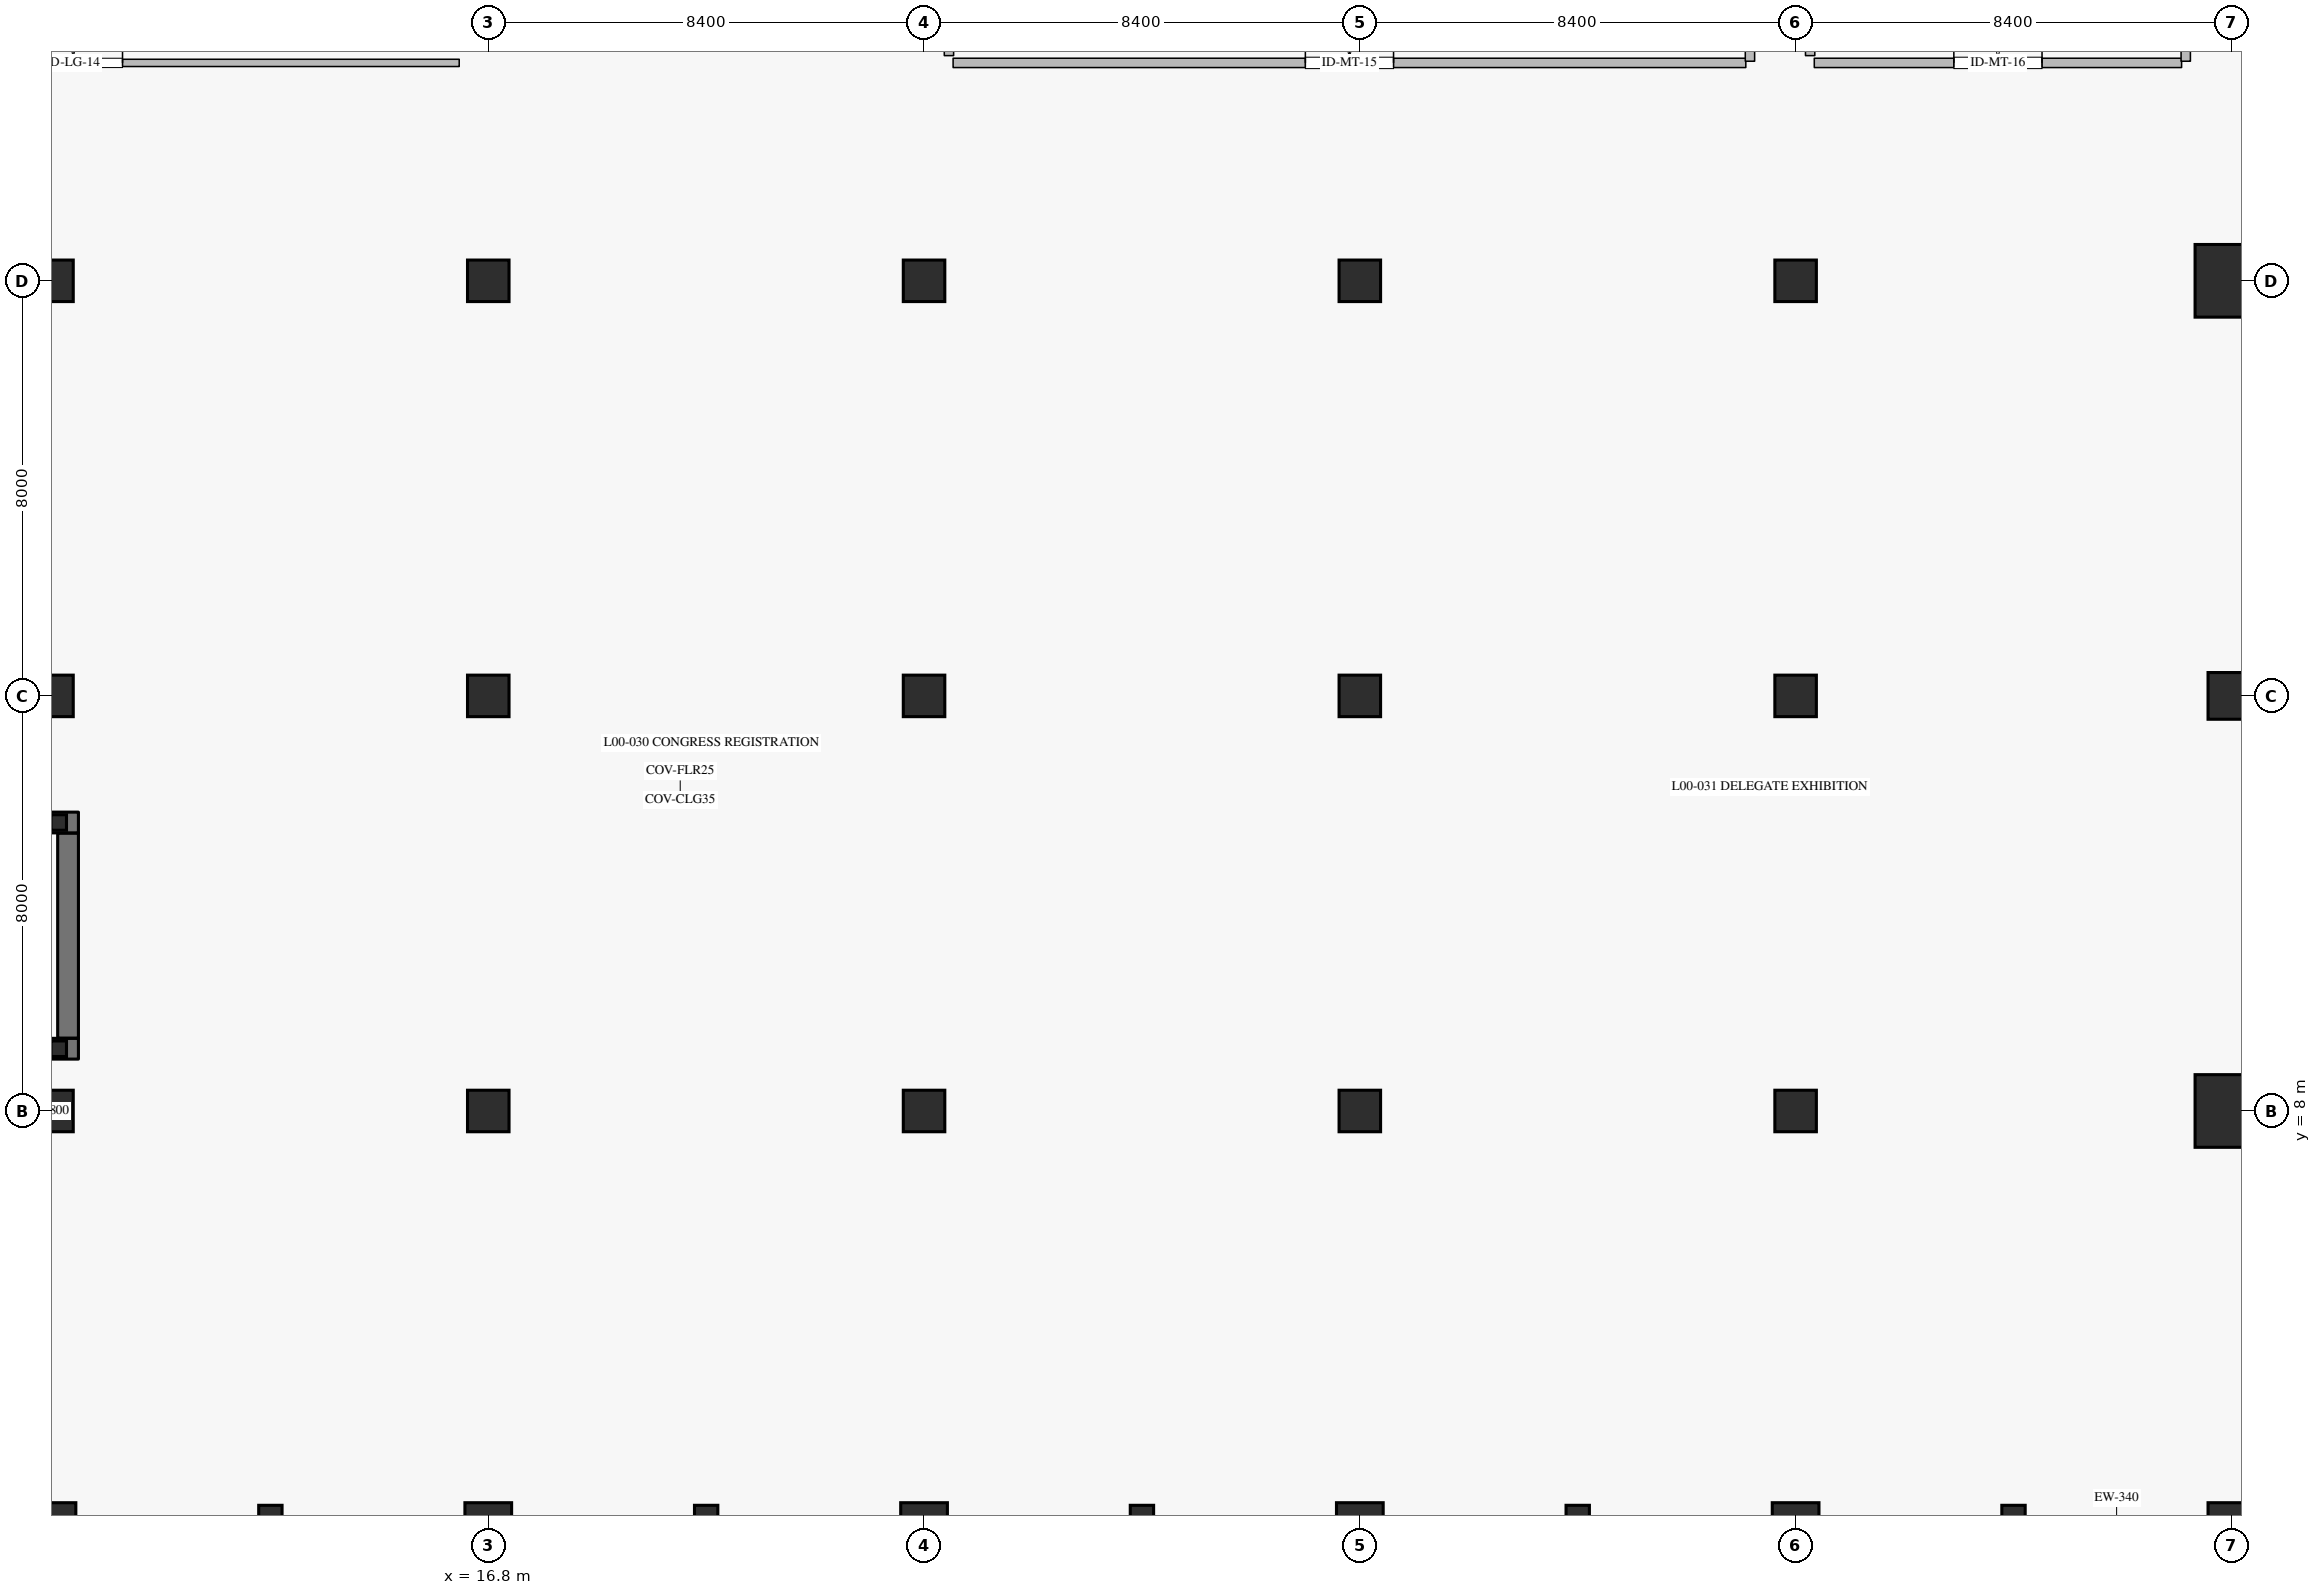
"""IFC4 building model, lengths in metres.
Left out: names, types, materials, properties, quantities, classifications, styles, units other than length and angle.
Written with IfcOpenShell. Run it as: python <this file> out.ifc"""

import sys

from ifc_helpers import new_model, si_unit, direction, frame, frame_2d, origin, origin_2d, place, context, subcontext, project, spatial, rectangle, hollow_rectangle, circle, extrude, element, fill, save


model = new_model("IFC4")
c1 = context("Model", 3, precision=1e-05, world=origin(), true_north=direction((0.0, 1.0)))
c2 = subcontext(c1, "Body", "Model", "MODEL_VIEW")
j1 = project(units=[si_unit("LENGTHUNIT", "METRE"), si_unit("PLANEANGLEUNIT", "RADIAN")], contexts=[c1])
p1 = place(None, origin())
s1 = spatial("IfcSite", under=j1, at=p1, CompositionType="ELEMENT")
p2 = place(p1, origin())
s2 = spatial("IfcBuilding", under=s1, at=p2, CompositionType="ELEMENT")
p3 = place(p2, origin())
s3 = spatial("IfcBuildingStorey", under=s2, at=p3, CompositionType="ELEMENT", Elevation=0.0)
p4 = place(p3, frame((8.4, 0.0, 0.0), z_axis=(0.0, 0.0, 1.0), x_axis=(1.0, 0.0, 0.0)))
e1 = element("IfcColumn", 1, at=p4, inside=s3, PredefinedType="COLUMN", context=c2, shape_type="SweptSolid", body=[
    extrude(rectangle(XDim=0.9, YDim=0.9, at=origin_2d()), origin(), (0.0, 0.0, 1.0), 6.0),
])
for number, where, z_axis, x_axis in (
    (2, (8.4, 8.0, 0.0), (0.0, 0.0, 1.0), (1.0, 0.0, 0.0)),
    (3, (8.4, 16.0, 0.0), (0.0, 0.0, 1.0), (1.0, 0.0, 0.0)),
    (4, (8.4, 24.0, 0.0), (0.0, 0.0, 1.0), (1.0, 0.0, 0.0)),
):
    element("IfcColumn", number, at=place(p3, frame(where, z_axis=z_axis, x_axis=x_axis)), inside=s3, PredefinedType="COLUMN", context=c2, shape_type="SweptSolid", body=[
        extrude(rectangle(XDim=0.8, YDim=0.8, at=origin_2d()), origin(), (0.0, 0.0, 1.0), 6.0),
    ])
p5 = place(p3, frame((12.6, 0.0, 0.0), z_axis=(0.0, 0.0, 1.0), x_axis=(1.0, 0.0, 0.0)))
e5 = element("IfcColumn", 5, at=p5, inside=s3, PredefinedType="PILASTER", context=c2, shape_type="SweptSolid", body=[
    extrude(rectangle(XDim=0.45, YDim=0.8, at=origin_2d()), origin(), (0.0, 0.0, 1.0), 6.0),
])
p6 = place(p3, frame((16.8, 0.0, 0.0), z_axis=(0.0, 0.0, 1.0), x_axis=(1.0, 0.0, 0.0)))
e6 = element("IfcColumn", 6, at=p6, inside=s3, PredefinedType="COLUMN", context=c2, shape_type="SweptSolid", body=[
    extrude(rectangle(XDim=0.9, YDim=0.9, at=origin_2d()), origin(), (0.0, 0.0, 1.0), 6.0),
])
for number, where, z_axis, x_axis in (
    (7, (16.8, 8.0, 0.0), (0.0, 0.0, 1.0), (1.0, 0.0, 0.0)),
    (8, (16.8, 16.0, 0.0), (0.0, 0.0, 1.0), (1.0, 0.0, 0.0)),
    (9, (16.8, 24.0, 0.0), (0.0, 0.0, 1.0), (1.0, 0.0, 0.0)),
):
    element("IfcColumn", number, at=place(p3, frame(where, z_axis=z_axis, x_axis=x_axis)), inside=s3, PredefinedType="COLUMN", context=c2, shape_type="SweptSolid", body=[
        extrude(rectangle(XDim=0.8, YDim=0.8, at=origin_2d()), origin(), (0.0, 0.0, 1.0), 6.0),
    ])
p7 = place(p3, frame((21.0, 0.0, 0.0), z_axis=(0.0, 0.0, 1.0), x_axis=(1.0, 0.0, 0.0)))
e10 = element("IfcColumn", 10, at=p7, inside=s3, PredefinedType="PILASTER", context=c2, shape_type="SweptSolid", body=[
    extrude(rectangle(XDim=0.45, YDim=0.8, at=origin_2d()), origin(), (0.0, 0.0, 1.0), 6.0),
])
p8 = place(p3, frame((25.2, 0.0, 0.0), z_axis=(0.0, 0.0, 1.0), x_axis=(1.0, 0.0, 0.0)))
e11 = element("IfcColumn", 11, at=p8, inside=s3, PredefinedType="COLUMN", context=c2, shape_type="SweptSolid", body=[
    extrude(rectangle(XDim=0.9, YDim=0.9, at=origin_2d()), origin(), (0.0, 0.0, 1.0), 6.0),
])
for number, where, z_axis, x_axis in (
    (12, (25.2, 8.0, 0.0), (0.0, 0.0, 1.0), (1.0, 0.0, 0.0)),
    (13, (25.2, 16.0, 0.0), (0.0, 0.0, 1.0), (1.0, 0.0, 0.0)),
    (14, (25.2, 24.0, 0.0), (0.0, 0.0, 1.0), (1.0, 0.0, 0.0)),
):
    element("IfcColumn", number, at=place(p3, frame(where, z_axis=z_axis, x_axis=x_axis)), inside=s3, PredefinedType="COLUMN", context=c2, shape_type="SweptSolid", body=[
        extrude(rectangle(XDim=0.8, YDim=0.8, at=origin_2d()), origin(), (0.0, 0.0, 1.0), 6.0),
    ])
p9 = place(p3, frame((29.4, 0.0, 0.0), z_axis=(0.0, 0.0, 1.0), x_axis=(1.0, 0.0, 0.0)))
e15 = element("IfcColumn", 15, at=p9, inside=s3, PredefinedType="PILASTER", context=c2, shape_type="SweptSolid", body=[
    extrude(rectangle(XDim=0.45, YDim=0.8, at=origin_2d()), origin(), (0.0, 0.0, 1.0), 6.0),
])
p10 = place(p3, frame((33.6, 0.0, 0.0), z_axis=(0.0, 0.0, 1.0), x_axis=(1.0, 0.0, 0.0)))
e16 = element("IfcColumn", 16, at=p10, inside=s3, PredefinedType="COLUMN", context=c2, shape_type="SweptSolid", body=[
    extrude(rectangle(XDim=0.9, YDim=0.9, at=origin_2d()), origin(), (0.0, 0.0, 1.0), 6.0),
])
for number, where, z_axis, x_axis in (
    (17, (33.6, 8.0, 0.0), (0.0, 0.0, 1.0), (1.0, 0.0, 0.0)),
    (18, (33.6, 16.0, 0.0), (0.0, 0.0, 1.0), (1.0, 0.0, 0.0)),
    (19, (33.6, 24.0, 0.0), (0.0, 0.0, 1.0), (1.0, 0.0, 0.0)),
):
    element("IfcColumn", number, at=place(p3, frame(where, z_axis=z_axis, x_axis=x_axis)), inside=s3, PredefinedType="COLUMN", context=c2, shape_type="SweptSolid", body=[
        extrude(rectangle(XDim=0.8, YDim=0.8, at=origin_2d()), origin(), (0.0, 0.0, 1.0), 6.0),
    ])
p11 = place(p3, frame((37.8, 0.0, 0.0), z_axis=(0.0, 0.0, 1.0), x_axis=(1.0, 0.0, 0.0)))
e20 = element("IfcColumn", 20, at=p11, inside=s3, PredefinedType="PILASTER", context=c2, shape_type="SweptSolid", body=[
    extrude(rectangle(XDim=0.45, YDim=0.8, at=origin_2d()), origin(), (0.0, 0.0, 1.0), 6.0),
])
p12 = place(p3, frame((42.0, 0.0, 0.0), z_axis=(0.0, 0.0, 1.0), x_axis=(1.0, 0.0, 0.0)))
e21 = element("IfcColumn", 21, at=p12, inside=s3, PredefinedType="COLUMN", context=c2, shape_type="SweptSolid", body=[
    extrude(rectangle(XDim=0.9, YDim=0.9, at=origin_2d()), origin(), (0.0, 0.0, 1.0), 6.0),
])
for number, where, z_axis, x_axis in (
    (22, (42.0, 8.0, 0.0), (0.0, 0.0, 1.0), (1.0, 0.0, 0.0)),
    (23, (42.0, 16.0, 0.0), (0.0, 0.0, 1.0), (1.0, 0.0, 0.0)),
    (24, (42.0, 24.0, 0.0), (0.0, 0.0, 1.0), (1.0, 0.0, 0.0)),
):
    element("IfcColumn", number, at=place(p3, frame(where, z_axis=z_axis, x_axis=x_axis)), inside=s3, PredefinedType="COLUMN", context=c2, shape_type="SweptSolid", body=[
        extrude(rectangle(XDim=0.8, YDim=0.8, at=origin_2d()), origin(), (0.0, 0.0, 1.0), 6.0),
    ])
p13 = place(p3, frame((46.2, 0.0, 0.0), z_axis=(0.0, 0.0, 1.0), x_axis=(1.0, 0.0, 0.0)))
e25 = element("IfcColumn", 25, at=p13, inside=s3, PredefinedType="PILASTER", context=c2, shape_type="SweptSolid", body=[
    extrude(rectangle(XDim=0.45, YDim=0.8, at=origin_2d()), origin(), (0.0, 0.0, 1.0), 6.0),
])
p14 = place(p3, frame((50.4, 0.0, 0.0), z_axis=(0.0, 0.0, 1.0), x_axis=(1.0, 0.0, 0.0)))
e26 = element("IfcColumn", 26, at=p14, inside=s3, PredefinedType="COLUMN", context=c2, shape_type="SweptSolid", body=[
    extrude(rectangle(XDim=0.9, YDim=0.9, at=origin_2d()), origin(), (0.0, 0.0, 1.0), 6.0),
])
p15 = place(p3, frame((50.4, 8.0, 0.0), z_axis=(0.0, 0.0, 1.0), x_axis=(1.0, 0.0, 0.0)))
e27 = element("IfcColumn", 27, at=p15, inside=s3, PredefinedType="COLUMN", context=c2, shape_type="SweptSolid", body=[
    extrude(circle(Radius=0.7, at=origin_2d()), origin(), (0.0, 0.0, 1.0), 6.0),
])
p16 = place(p3, frame((50.4, 16.0, 0.0), z_axis=(0.0, 0.0, 1.0), x_axis=(1.0, 0.0, 0.0)))
e28 = element("IfcColumn", 28, at=p16, inside=s3, PredefinedType="COLUMN", context=c2, shape_type="SweptSolid", body=[
    extrude(rectangle(XDim=0.9, YDim=0.9, at=origin_2d()), origin(), (0.0, 0.0, 1.0), 6.0),
])
p17 = place(p3, frame((50.4, 24.0, 0.0), z_axis=(0.0, 0.0, 1.0), x_axis=(1.0, 0.0, 0.0)))
e29 = element("IfcColumn", 29, at=p17, inside=s3, PredefinedType="COLUMN", context=c2, shape_type="SweptSolid", body=[
    extrude(circle(Radius=0.7, at=origin_2d()), origin(), (0.0, 0.0, 1.0), 6.0),
])
p18 = place(p3, frame((0.7, 9.2, 0.0), z_axis=(0.0, 0.0, 1.0), x_axis=(1.0, 0.0, 0.0)))
e30 = element("IfcWall", 30, at=p18, inside=s3, PredefinedType="SHEAR", context=c2, shape_type="SweptSolid", body=[
    extrude(rectangle(XDim=8.2, YDim=0.4, at=frame_2d((4.1, 0.0))), origin(), (0.0, 0.0, 1.0), 5.675),
])
p19 = place(p3, frame((8.7, 9.405, 0.0), z_axis=(0.0, 0.0, 1.0), x_axis=(0.0, 1.0, 0.0)))
e31 = element("IfcWall", 31, at=p19, inside=s3, PredefinedType="SHEAR", context=c2, shape_type="SweptSolid", body=[
    extrude(rectangle(XDim=3.95, YDim=0.4, at=frame_2d((1.975, 0.0))), origin(), (0.0, 0.0, 1.0), 5.675),
])
p20 = place(p3, frame((0.7, 13.56, 0.0), z_axis=(0.0, 0.0, 1.0), x_axis=(1.0, 0.0, 0.0)))
e32 = element("IfcWall", 32, at=p20, inside=s3, PredefinedType="SHEAR", context=c2, shape_type="SweptSolid", body=[
    extrude(rectangle(XDim=8.2, YDim=0.4, at=frame_2d((4.1, 0.0))), origin(), (0.0, 0.0, 1.0), 5.675),
])
p21 = place(p20, frame((0.62, 0.0, 0.0)))
e33 = element("IfcOpeningElement", 33, at=p21, cuts=e32, PredefinedType="OPENING", context=c2, shape_type="SweptSolid", body=[
    extrude(rectangle(XDim=1.16, YDim=2.2, at=frame_2d((0.58, 1.1))), frame((0.0, 0.21, 0.0), z_axis=(0.0, -1.0, 0.0), x_axis=(1.0, 0.0, 0.0)), (0.0, 0.0, 1.0), 0.42),
])
for number, where, z_axis, x_axis in (
    (34, (8.52, 9.2, -2.7), (0.0, 0.0, 1.0), (1.0, 0.0, 0.0)),
    (35, (8.52, 13.56, -2.7), (0.0, 0.0, 1.0), (1.0, 0.0, 0.0)),
):
    element("IfcColumn", number, at=place(p3, frame(where, z_axis=z_axis, x_axis=x_axis)), inside=s3, PredefinedType="COLUMN", context=c2, shape_type="SweptSolid", body=[
        extrude(hollow_rectangle(XDim=0.3, YDim=0.3, WallThickness=0.012, at=origin_2d()), origin(), (0.0, 0.0, 1.0), 5.52),
    ])
p22 = place(p3, frame((1.36, 28.2, 0.0), z_axis=(0.0, 0.0, 1.0), x_axis=(1.0, 0.0, 0.0)))
e36 = element("IfcWall", 36, at=p22, inside=s3, PredefinedType="PARTITIONING", context=c2, shape_type="SweptSolid", body=[
    extrude(rectangle(XDim=14.88, YDim=0.14, at=frame_2d((7.44, 0.0))), origin(), (0.0, 0.0, 1.0), 5.675),
])
p23 = place(p22, frame((6.49, 0.0, 0.0)))
e37 = element("IfcOpeningElement", 37, at=p23, cuts=e36, PredefinedType="OPENING", context=c2, shape_type="SweptSolid", body=[
    extrude(rectangle(XDim=1.9, YDim=2.4, at=frame_2d((0.95, 1.2))), frame((0.0, 0.08, 0.0), z_axis=(0.0, -1.0, 0.0), x_axis=(1.0, 0.0, 0.0)), (0.0, 0.0, 1.0), 0.16),
])
p24 = place(p3, frame((25.76, 28.2, 0.0), z_axis=(0.0, 0.0, 1.0), x_axis=(1.0, 0.0, 0.0)))
e38 = element("IfcWall", 38, at=p24, inside=s3, PredefinedType="PARTITIONING", context=c2, shape_type="SweptSolid", body=[
    extrude(rectangle(XDim=15.28, YDim=0.18, at=frame_2d((7.64, 0.0))), origin(), (0.0, 0.0, 1.0), 5.675),
])
p25 = place(p24, frame((6.79, 0.0, 0.0)))
e39 = element("IfcOpeningElement", 39, at=p25, cuts=e38, PredefinedType="OPENING", context=c2, shape_type="SweptSolid", body=[
    extrude(rectangle(XDim=1.7, YDim=2.3, at=frame_2d((0.85, 1.15))), frame((0.0, 0.1, 0.0), z_axis=(0.0, -1.0, 0.0), x_axis=(1.0, 0.0, 0.0)), (0.0, 0.0, 1.0), 0.2),
])
p26 = place(p3, frame((25.68, 28.34, 0.0), z_axis=(0.0, 0.0, 1.0), x_axis=(0.0, 1.0, 0.0)))
e40 = element("IfcWall", 40, at=p26, inside=s3, PredefinedType="PARTITIONING", context=c2, shape_type="SweptSolid", body=[
    extrude(rectangle(XDim=14.21, YDim=0.18, at=frame_2d((7.105, 0.0))), origin(), (0.0, 0.0, 1.0), 5.675),
])
p27 = place(p3, frame((42.36, 28.2, 0.0), z_axis=(0.0, 0.0, 1.0), x_axis=(1.0, 0.0, 0.0)))
e41 = element("IfcWall", 41, at=p27, inside=s3, PredefinedType="PARTITIONING", context=c2, shape_type="SweptSolid", body=[
    extrude(rectangle(XDim=7.08, YDim=0.18, at=frame_2d((3.54, 0.0))), origin(), (0.0, 0.0, 1.0), 5.675),
])
p28 = place(p27, frame((2.69, 0.0, 0.0)))
e42 = element("IfcOpeningElement", 42, at=p28, cuts=e41, PredefinedType="OPENING", context=c2, shape_type="SweptSolid", body=[
    extrude(rectangle(XDim=1.7, YDim=2.3, at=frame_2d((0.85, 1.15))), frame((0.0, 0.1, 0.0), z_axis=(0.0, -1.0, 0.0), x_axis=(1.0, 0.0, 0.0)), (0.0, 0.0, 1.0), 0.2),
])
p29 = place(p3, frame((42.28, 28.34, 0.0), z_axis=(0.0, 0.0, 1.0), x_axis=(0.0, 1.0, 0.0)))
e43 = element("IfcWall", 43, at=p29, inside=s3, PredefinedType="PARTITIONING", context=c2, shape_type="SweptSolid", body=[
    extrude(rectangle(XDim=14.21, YDim=0.18, at=frame_2d((7.105, 0.0))), origin(), (0.0, 0.0, 1.0), 5.675),
])
for number, where, z_axis, x_axis in (
    (44, (41.12, 28.232, 0.0), (0.0, 0.0, 1.0), (0.0, 1.0, 0.0)),
    (45, (49.52, 28.232, 0.0), (0.0, 0.0, 1.0), (0.0, 1.0, 0.0)),
):
    element("IfcWall", number, at=place(p3, frame(where, z_axis=z_axis, x_axis=x_axis)), inside=s3, PredefinedType="PARTITIONING", context=c2, shape_type="SweptSolid", body=[
        extrude(rectangle(XDim=14.568, YDim=0.18, at=frame_2d((7.284, 0.0))), origin(), (0.0, 0.0, 1.0), 5.675),
    ])
p30 = place(p23, origin())
e46 = element("IfcDoor", 46, at=p30, inside=s3, OperationType="DOUBLE_DOOR_SINGLE_SWING", PredefinedType="DOOR", context=c2, shape_type="SweptSolid", body=[
    extrude(rectangle(XDim=1.9, YDim=2.4, at=frame_2d((0.95, 1.2))), frame((0.0, 0.025, 0.0), z_axis=(0.0, -1.0, 0.0), x_axis=(1.0, 0.0, 0.0)), (0.0, 0.0, 1.0), 0.05),
])
fill(e37, e46)
p31 = place(p25, origin())
e47 = element("IfcDoor", 47, at=p31, inside=s3, OperationType="DOUBLE_DOOR_SINGLE_SWING", PredefinedType="DOOR", context=c2, shape_type="SweptSolid", body=[
    extrude(rectangle(XDim=1.7, YDim=2.3, at=frame_2d((0.85, 1.15))), frame((0.0, 0.025, 0.0), z_axis=(0.0, -1.0, 0.0), x_axis=(1.0, 0.0, 0.0)), (0.0, 0.0, 1.0), 0.05),
])
fill(e39, e47)
p32 = place(p28, origin())
e48 = element("IfcDoor", 48, at=p32, inside=s3, OperationType="DOUBLE_DOOR_SINGLE_SWING", PredefinedType="DOOR", context=c2, shape_type="SweptSolid", body=[
    extrude(rectangle(XDim=1.7, YDim=2.3, at=frame_2d((0.85, 1.15))), frame((0.0, 0.025, 0.0), z_axis=(0.0, -1.0, 0.0), x_axis=(1.0, 0.0, 0.0)), (0.0, 0.0, 1.0), 0.05),
])
fill(e42, e48)
save(model, sys.argv[1])
